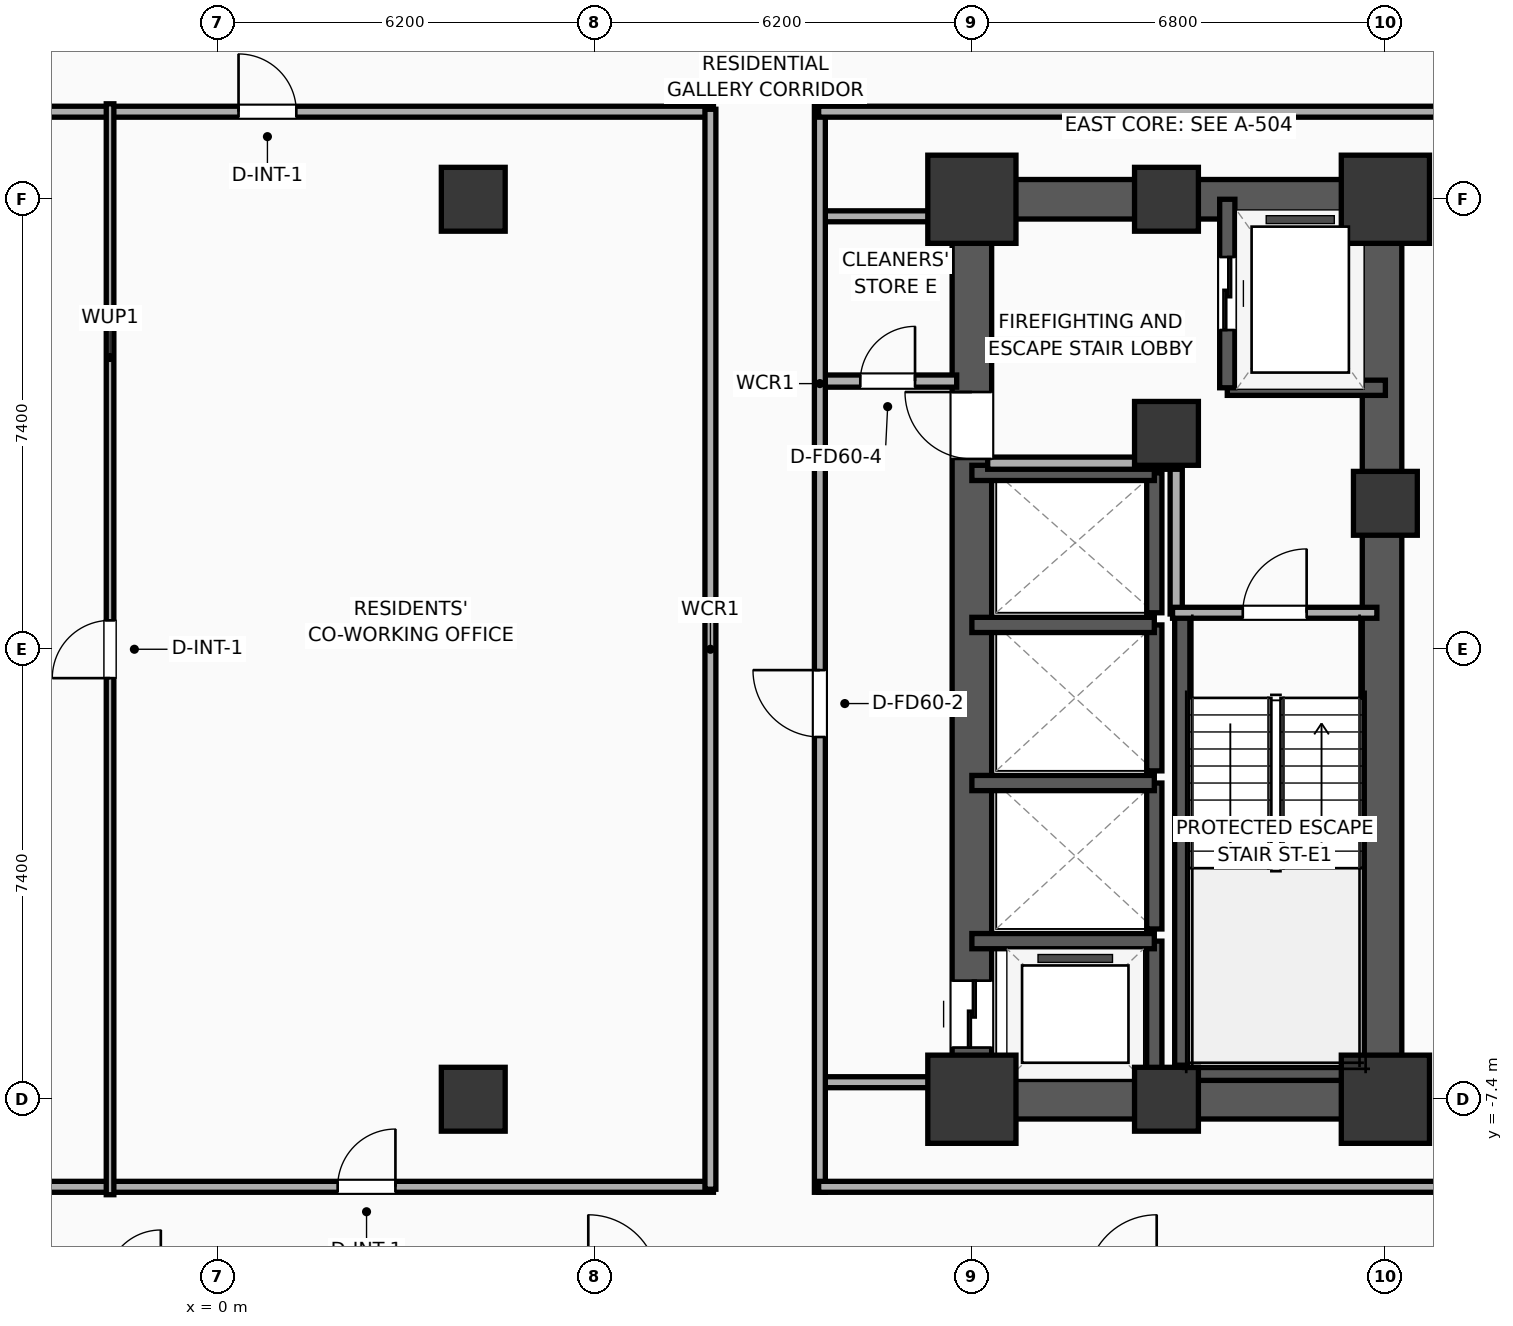
"""IFC4 building model, lengths in metres.
Left out: names, types, materials, properties, quantities, classifications, styles, units other than length and angle.
Written with IfcOpenShell. Run it as: python <this file> out.ifc"""

import sys

from ifc_helpers import new_model, si_unit, direction, frame, frame_2d, origin, origin_2d, place, context, subcontext, project, spatial, rectangle, extrude, element, fill, save


model = new_model("IFC4")
c1 = context("Model", 3, precision=1e-05, world=origin(), true_north=direction((0.0, 1.0)))
c2 = subcontext(c1, "Body", "Model", "MODEL_VIEW")
j1 = project(units=[si_unit("LENGTHUNIT", "METRE"), si_unit("PLANEANGLEUNIT", "RADIAN")], contexts=[c1])
p1 = place(None, origin())
s1 = spatial("IfcSite", under=j1, at=p1, CompositionType="ELEMENT")
p2 = place(p1, origin())
s2 = spatial("IfcBuilding", under=s1, at=p2, CompositionType="ELEMENT")
p3 = place(p2, frame((0.0, 0.0, 72.8)))
s3 = spatial("IfcBuildingStorey", under=s2, at=p3, CompositionType="ELEMENT", Elevation=72.8)
p4 = place(p3, frame((12.4, -7.4, 0.0), z_axis=(0.0, 0.0, 1.0), x_axis=(1.0, 0.0, 0.0)))
e1 = element("IfcColumn", 1, at=p4, inside=s3, PredefinedType="COLUMN", context=c2, shape_type="SweptSolid", body=[
    extrude(rectangle(XDim=1.45, YDim=1.45, at=origin_2d()), origin(), (0.0, 0.0, 1.0), 3.9),
])
p5 = place(p3, frame((15.6, 3.55, 0.0), z_axis=(0.0, 0.0, 1.0), x_axis=(1.0, 0.0, 0.0)))
e2 = element("IfcColumn", 2, at=p5, inside=s3, PredefinedType="COLUMN", context=c2, shape_type="SweptSolid", body=[
    extrude(rectangle(XDim=1.05, YDim=1.05, at=origin_2d()), origin(), (0.0, 0.0, 1.0), 3.9),
])
p6 = place(p3, frame((12.4, 7.4, 0.0), z_axis=(0.0, 0.0, 1.0), x_axis=(1.0, 0.0, 0.0)))
e3 = element("IfcColumn", 3, at=p6, inside=s3, PredefinedType="COLUMN", context=c2, shape_type="SweptSolid", body=[
    extrude(rectangle(XDim=1.45, YDim=1.45, at=origin_2d()), origin(), (0.0, 0.0, 1.0), 3.9),
])
for number, where, z_axis, x_axis in (
    (4, (15.6, -7.4, 0.0), (0.0, 0.0, 1.0), (1.0, 0.0, 0.0)),
    (5, (15.6, 7.4, 0.0), (0.0, 0.0, 1.0), (1.0, 0.0, 0.0)),
):
    element("IfcColumn", number, at=place(p3, frame(where, z_axis=z_axis, x_axis=x_axis)), inside=s3, PredefinedType="COLUMN", context=c2, shape_type="SweptSolid", body=[
        extrude(rectangle(XDim=1.05, YDim=1.05, at=origin_2d()), origin(), (0.0, 0.0, 1.0), 3.9),
    ])
p7 = place(p3, frame((19.2, -7.4, 0.0), z_axis=(0.0, 0.0, 1.0), x_axis=(1.0, 0.0, 0.0)))
e6 = element("IfcColumn", 6, at=p7, inside=s3, PredefinedType="COLUMN", context=c2, shape_type="SweptSolid", body=[
    extrude(rectangle(XDim=1.45, YDim=1.45, at=origin_2d()), origin(), (0.0, 0.0, 1.0), 3.9),
])
p8 = place(p3, frame((19.2, 2.4, 0.0), z_axis=(0.0, 0.0, 1.0), x_axis=(1.0, 0.0, 0.0)))
e7 = element("IfcColumn", 7, at=p8, inside=s3, PredefinedType="COLUMN", context=c2, shape_type="SweptSolid", body=[
    extrude(rectangle(XDim=1.05, YDim=1.05, at=origin_2d()), origin(), (0.0, 0.0, 1.0), 3.9),
])
p9 = place(p3, frame((19.2, 7.4, 0.0), z_axis=(0.0, 0.0, 1.0), x_axis=(1.0, 0.0, 0.0)))
e8 = element("IfcColumn", 8, at=p9, inside=s3, PredefinedType="COLUMN", context=c2, shape_type="SweptSolid", body=[
    extrude(rectangle(XDim=1.45, YDim=1.45, at=origin_2d()), origin(), (0.0, 0.0, 1.0), 3.9),
])
for number, where, z_axis, x_axis in (
    (9, (12.075, -7.4, 0.0), (0.0, 0.0, 1.0), (1.0, 0.0, 0.0)),
    (10, (12.075, 7.4, 0.0), (0.0, 0.0, 1.0), (1.0, 0.0, 0.0)),
):
    element("IfcWall", number, at=place(p3, frame(where, z_axis=z_axis, x_axis=x_axis)), inside=s3, PredefinedType="SHEAR", context=c2, shape_type="SweptSolid", body=[
        extrude(rectangle(XDim=7.45, YDim=0.65, at=frame_2d((3.725, 0.0))), origin(), (0.0, 0.0, 1.0), 3.65),
    ])
p10 = place(p3, frame((12.4, -7.4, 0.0), z_axis=(0.0, 0.0, 1.0), x_axis=(0.0, 1.0, 0.0)))
e11 = element("IfcWall", 11, at=p10, inside=s3, PredefinedType="SHEAR", context=c2, shape_type="SweptSolid", body=[
    extrude(rectangle(XDim=14.8, YDim=0.65, at=frame_2d((7.4, 0.0))), origin(), (0.0, 0.0, 1.0), 3.65),
])
p11 = place(p10, frame((0.85, 0.0, 0.0)))
e12 = element("IfcOpeningElement", 12, at=p11, cuts=e11, PredefinedType="OPENING", context=c2, shape_type="SweptSolid", body=[
    extrude(rectangle(XDim=1.1, YDim=2.05, at=frame_2d((0.55, 1.025))), frame((0.0, 0.335, 0.0), z_axis=(0.0, -1.0, 0.0), x_axis=(1.0, 0.0, 0.0)), (0.0, 0.0, 1.0), 0.67),
])
p12 = place(p10, frame((10.53, 0.0, 0.0)))
e13 = element("IfcOpeningElement", 13, at=p12, cuts=e11, PredefinedType="OPENING", context=c2, shape_type="SweptSolid", body=[
    extrude(rectangle(XDim=1.1, YDim=2.05, at=frame_2d((0.55, 1.025))), frame((0.0, 0.335, 0.0), z_axis=(0.0, -1.0, 0.0), x_axis=(1.0, 0.0, 0.0)), (0.0, 0.0, 1.0), 0.67),
])
p13 = place(p3, frame((19.145, -7.4, 0.0), z_axis=(0.0, 0.0, 1.0), x_axis=(0.0, 1.0, 0.0)))
e14 = element("IfcWall", 14, at=p13, inside=s3, PredefinedType="SHEAR", context=c2, shape_type="SweptSolid", body=[
    extrude(rectangle(XDim=14.8, YDim=0.65, at=frame_2d((7.4, 0.0))), origin(), (0.0, 0.0, 1.0), 3.65),
])
p14 = place(p3, frame((15.86, -7.085, 0.0), z_axis=(0.0, 0.0, 1.0), x_axis=(0.0, 1.0, 0.0)))
e15 = element("IfcWall", 15, at=p14, inside=s3, PredefinedType="SOLIDWALL", context=c2, shape_type="SweptSolid", body=[
    extrude(rectangle(XDim=7.685, YDim=0.25, at=frame_2d((3.843, 0.0))), origin(), (0.0, 0.0, 1.0), 3.65),
])
p15 = place(p3, frame((15.74, -6.965, 0.0), z_axis=(0.0, 0.0, 1.0), x_axis=(1.0, 0.0, 0.0)))
e16 = element("IfcWall", 16, at=p15, inside=s3, PredefinedType="SOLIDWALL", context=c2, shape_type="SweptSolid", body=[
    extrude(rectangle(XDim=3.46, YDim=0.25, at=frame_2d((1.73, 0.0))), origin(), (0.0, 0.0, 1.0), 3.65),
])
for number, where, z_axis, x_axis in (
    (17, (4.2, -7.4, 0.0), (0.0, 0.0, 1.0), (1.0, 0.0, 0.0)),
    (18, (4.2, 7.4, 0.0), (0.0, 0.0, 1.0), (1.0, 0.0, 0.0)),
):
    element("IfcColumn", number, at=place(p3, frame(where, z_axis=z_axis, x_axis=x_axis)), inside=s3, PredefinedType="COLUMN", context=c2, shape_type="SweptSolid", body=[
        extrude(rectangle(XDim=1.05, YDim=1.05, at=origin_2d()), origin(), (0.0, 0.0, 1.0), 3.9),
    ])
p16 = place(p3, frame((16.6, 4.3, 0.0), z_axis=(0.0, 0.0, 1.0), x_axis=(1.0, 0.0, 0.0)))
e19 = element("IfcWall", 19, at=p16, inside=s3, PredefinedType="SOLIDWALL", context=c2, shape_type="SweptSolid", body=[
    extrude(rectangle(XDim=2.6, YDim=0.25, at=frame_2d((1.3, 0.0))), origin(), (0.0, 0.0, 1.0), 3.65),
])
p17 = place(p3, frame((16.6, 7.4, 0.0), z_axis=(0.0, 0.0, 1.0), x_axis=(0.0, -1.0, 0.0)))
e20 = element("IfcWall", 20, at=p17, inside=s3, PredefinedType="SOLIDWALL", context=c2, shape_type="SweptSolid", body=[
    extrude(rectangle(XDim=3.1, YDim=0.25, at=frame_2d((1.55, 0.0))), origin(), (0.0, 0.0, 1.0), 3.65),
])
p18 = place(p17, frame((0.95, 0.0, 0.0)))
e21 = element("IfcOpeningElement", 21, at=p18, cuts=e20, PredefinedType="OPENING", context=c2, shape_type="SweptSolid", body=[
    extrude(rectangle(XDim=1.2, YDim=2.05, at=frame_2d((0.6, 1.025))), frame((0.0, 0.135, 0.0), z_axis=(0.0, -1.0, 0.0), x_axis=(1.0, 0.0, 0.0)), (0.0, 0.0, 1.0), 0.27),
])
p19 = place(p3, frame((15.4, -7.4, 0.0), z_axis=(0.0, 0.0, 1.0), x_axis=(0.0, 1.0, 0.0)))
e22 = element("IfcWall", 22, at=p19, inside=s3, PredefinedType="SOLIDWALL", context=c2, shape_type="SweptSolid", body=[
    extrude(rectangle(XDim=2.6, YDim=0.25, at=frame_2d((1.3, 0.0))), origin(), (0.0, 0.0, 1.0), 3.65),
])
p20 = place(p3, frame((15.4, -4.8, 0.0), z_axis=(0.0, 0.0, 1.0), x_axis=(-1.0, 0.0, 0.0)))
e23 = element("IfcWall", 23, at=p20, inside=s3, PredefinedType="SOLIDWALL", context=c2, shape_type="SweptSolid", body=[
    extrude(rectangle(XDim=3.0, YDim=0.25, at=frame_2d((1.5, 0.0))), origin(), (0.0, 0.0, 1.0), 3.65),
])
p21 = place(p3, frame((15.4, -4.6, 0.0), z_axis=(0.0, 0.0, 1.0), x_axis=(0.0, 1.0, 0.0)))
e24 = element("IfcWall", 24, at=p21, inside=s3, PredefinedType="SOLIDWALL", context=c2, shape_type="SweptSolid", body=[
    extrude(rectangle(XDim=2.4, YDim=0.25, at=frame_2d((1.2, 0.0))), origin(), (0.0, 0.0, 1.0), 3.65),
])
p22 = place(p3, frame((15.4, -2.2, 0.0), z_axis=(0.0, 0.0, 1.0), x_axis=(-1.0, 0.0, 0.0)))
e25 = element("IfcWall", 25, at=p22, inside=s3, PredefinedType="SOLIDWALL", context=c2, shape_type="SweptSolid", body=[
    extrude(rectangle(XDim=3.0, YDim=0.25, at=frame_2d((1.5, 0.0))), origin(), (0.0, 0.0, 1.0), 3.65),
])
p23 = place(p3, frame((15.4, -2.0, 0.0), z_axis=(0.0, 0.0, 1.0), x_axis=(0.0, 1.0, 0.0)))
e26 = element("IfcWall", 26, at=p23, inside=s3, PredefinedType="SOLIDWALL", context=c2, shape_type="SweptSolid", body=[
    extrude(rectangle(XDim=2.4, YDim=0.25, at=frame_2d((1.2, 0.0))), origin(), (0.0, 0.0, 1.0), 3.65),
])
p24 = place(p3, frame((15.4, 0.4, 0.0), z_axis=(0.0, 0.0, 1.0), x_axis=(-1.0, 0.0, 0.0)))
e27 = element("IfcWall", 27, at=p24, inside=s3, PredefinedType="SOLIDWALL", context=c2, shape_type="SweptSolid", body=[
    extrude(rectangle(XDim=3.0, YDim=0.25, at=frame_2d((1.5, 0.0))), origin(), (0.0, 0.0, 1.0), 3.65),
])
p25 = place(p3, frame((15.4, 0.6, 0.0), z_axis=(0.0, 0.0, 1.0), x_axis=(0.0, 1.0, 0.0)))
e28 = element("IfcWall", 28, at=p25, inside=s3, PredefinedType="SOLIDWALL", context=c2, shape_type="SweptSolid", body=[
    extrude(rectangle(XDim=2.3, YDim=0.25, at=frame_2d((1.15, 0.0))), origin(), (0.0, 0.0, 1.0), 3.65),
])
p26 = place(p3, frame((15.4, 2.9, 0.0), z_axis=(0.0, 0.0, 1.0), x_axis=(-1.0, 0.0, 0.0)))
e29 = element("IfcWall", 29, at=p26, inside=s3, PredefinedType="SOLIDWALL", context=c2, shape_type="SweptSolid", body=[
    extrude(rectangle(XDim=3.0, YDim=0.25, at=frame_2d((1.5, 0.0))), origin(), (0.0, 0.0, 1.0), 3.65),
])
p27 = place(p3, frame((15.76, 0.58, 0.0), z_axis=(0.0, 0.0, 1.0), x_axis=(0.0, 1.0, 0.0)))
e30 = element("IfcWall", 30, at=p27, inside=s3, PredefinedType="PARTITIONING", context=c2, shape_type="SweptSolid", body=[
    extrude(rectangle(XDim=2.52, YDim=0.2, at=frame_2d((1.26, 0.0))), origin(), (0.0, 0.0, 1.0), 3.65),
])
p28 = place(p3, frame((12.66, 3.06, 0.0), z_axis=(0.0, 0.0, 1.0), x_axis=(1.0, 0.0, 0.0)))
e31 = element("IfcWall", 31, at=p28, inside=s3, PredefinedType="PARTITIONING", context=c2, shape_type="SweptSolid", body=[
    extrude(rectangle(XDim=3.16, YDim=0.2, at=frame_2d((1.58, 0.0))), origin(), (0.0, 0.0, 1.0), 3.65),
])
p29 = place(p3, frame((15.7, 0.6, 0.0), z_axis=(0.0, 0.0, 1.0), x_axis=(1.0, 0.0, 0.0)))
e32 = element("IfcWall", 32, at=p29, inside=s3, PredefinedType="PARTITIONING", context=c2, shape_type="SweptSolid", body=[
    extrude(rectangle(XDim=3.36, YDim=0.18, at=frame_2d((1.68, 0.0))), origin(), (0.0, 0.0, 1.0), 3.65),
])
p30 = place(p29, frame((1.155, 0.0, 0.0)))
e33 = element("IfcOpeningElement", 33, at=p30, cuts=e32, PredefinedType="OPENING", context=c2, shape_type="SweptSolid", body=[
    extrude(rectangle(XDim=1.05, YDim=2.05, at=frame_2d((0.525, 1.025))), frame((0.0, 0.1, 0.0), z_axis=(0.0, -1.0, 0.0), x_axis=(1.0, 0.0, 0.0)), (0.0, 0.0, 1.0), 0.2),
])
p31 = place(p3, frame((9.88, 4.41, 0.0), z_axis=(0.0, 0.0, 1.0), x_axis=(1.0, 0.0, 0.0)))
e34 = element("IfcWall", 34, at=p31, inside=s3, PredefinedType="PARTITIONING", context=c2, shape_type="SweptSolid", body=[
    extrude(rectangle(XDim=2.27, YDim=0.2, at=frame_2d((1.135, 0.0))), origin(), (0.0, 0.0, 1.0), 3.65),
])
p32 = place(p31, frame((0.685, 0.0, 0.0)))
e35 = element("IfcOpeningElement", 35, at=p32, cuts=e34, PredefinedType="OPENING", context=c2, shape_type="SweptSolid", body=[
    extrude(rectangle(XDim=0.9, YDim=2.05, at=frame_2d((0.45, 1.025))), frame((0.0, 0.11, 0.0), z_axis=(0.0, -1.0, 0.0), x_axis=(1.0, 0.0, 0.0)), (0.0, 0.0, 1.0), 0.22),
])
for number, where, z_axis, x_axis in (
    (36, (9.88, 7.12, 0.0), (0.0, 0.0, 1.0), (1.0, 0.0, 0.0)),
    (37, (9.88, -7.12, 0.0), (0.0, 0.0, 1.0), (1.0, 0.0, 0.0)),
):
    element("IfcWall", number, at=place(p3, frame(where, z_axis=z_axis, x_axis=x_axis)), inside=s3, PredefinedType="PARTITIONING", context=c2, shape_type="SweptSolid", body=[
        extrude(rectangle(XDim=2.27, YDim=0.18, at=frame_2d((1.135, 0.0))), origin(), (0.0, 0.0, 1.0), 2.94),
    ])
p33 = place(p3, frame((9.9, -8.93, 0.0), z_axis=(0.0, 0.0, 1.0), x_axis=(0.0, 1.0, 0.0)))
e38 = element("IfcWall", 38, at=p33, inside=s3, PredefinedType="PARTITIONING", context=c2, shape_type="SweptSolid", body=[
    extrude(rectangle(XDim=17.86, YDim=0.18, at=frame_2d((8.93, 0.0))), origin(), (0.0, 0.0, 1.0), 3.65),
])
p34 = place(p33, frame((7.487, 0.0, 0.0)))
e39 = element("IfcOpeningElement", 39, at=p34, cuts=e38, PredefinedType="OPENING", context=c2, shape_type="SweptSolid", body=[
    extrude(rectangle(XDim=1.1, YDim=2.05, at=frame_2d((0.55, 1.025))), frame((0.0, 0.1, 0.0), z_axis=(0.0, -1.0, 0.0), x_axis=(1.0, 0.0, 0.0)), (0.0, 0.0, 1.0), 0.2),
])
p35 = place(p3, frame((9.88, 8.84, 0.0), z_axis=(0.0, 0.0, 1.0), x_axis=(1.0, 0.0, 0.0)))
e40 = element("IfcWall", 40, at=p35, inside=s3, PredefinedType="PARTITIONING", context=c2, shape_type="SweptSolid", body=[
    extrude(rectangle(XDim=16.33, YDim=0.18, at=frame_2d((8.165, 0.0))), origin(), (0.0, 0.0, 1.0), 3.65),
])
p36 = place(p35, frame((14.365, 0.0, 0.0)))
e41 = element("IfcOpeningElement", 41, at=p36, cuts=e40, PredefinedType="OPENING", context=c2, shape_type="SweptSolid", body=[
    extrude(rectangle(XDim=0.9, YDim=2.05, at=frame_2d((0.45, 1.025))), frame((0.0, 0.1, 0.0), z_axis=(0.0, -1.0, 0.0), x_axis=(1.0, 0.0, 0.0)), (0.0, 0.0, 1.0), 0.2),
])
p37 = place(p3, frame((9.88, -8.84, 0.0), z_axis=(0.0, 0.0, 1.0), x_axis=(1.0, 0.0, 0.0)))
e42 = element("IfcWall", 42, at=p37, inside=s3, PredefinedType="PARTITIONING", context=c2, shape_type="SweptSolid", body=[
    extrude(rectangle(XDim=16.33, YDim=0.18, at=frame_2d((8.165, 0.0))), origin(), (0.0, 0.0, 1.0), 3.65),
])
p38 = place(p3, frame((-8.15, 8.84, 0.0), z_axis=(0.0, 0.0, 1.0), x_axis=(1.0, 0.0, 0.0)))
e43 = element("IfcWall", 43, at=p38, inside=s3, PredefinedType="PARTITIONING", context=c2, shape_type="SweptSolid", body=[
    extrude(rectangle(XDim=16.3, YDim=0.18, at=frame_2d((8.15, 0.0))), origin(), (0.0, 0.0, 1.0), 3.65),
])
p39 = place(p38, frame((8.49, 0.0, 0.0)))
e44 = element("IfcOpeningElement", 44, at=p39, cuts=e43, PredefinedType="OPENING", context=c2, shape_type="SweptSolid", body=[
    extrude(rectangle(XDim=0.95, YDim=2.05, at=frame_2d((0.475, 1.025))), frame((0.0, 0.1, 0.0), z_axis=(0.0, -1.0, 0.0), x_axis=(1.0, 0.0, 0.0)), (0.0, 0.0, 1.0), 0.2),
])
p40 = place(p3, frame((-8.15, -8.84, 0.0), z_axis=(0.0, 0.0, 1.0), x_axis=(1.0, 0.0, 0.0)))
e45 = element("IfcWall", 45, at=p40, inside=s3, PredefinedType="PARTITIONING", context=c2, shape_type="SweptSolid", body=[
    extrude(rectangle(XDim=16.3, YDim=0.18, at=frame_2d((8.15, 0.0))), origin(), (0.0, 0.0, 1.0), 3.65),
])
p41 = place(p40, frame((1.13, 0.0, 0.0)))
e46 = element("IfcOpeningElement", 46, at=p41, cuts=e45, PredefinedType="OPENING", context=c2, shape_type="SweptSolid", body=[
    extrude(rectangle(XDim=1.0, YDim=2.05, at=frame_2d((0.5, 1.025))), frame((0.0, 0.1, 0.0), z_axis=(0.0, -1.0, 0.0), x_axis=(1.0, 0.0, 0.0)), (0.0, 0.0, 1.0), 0.2),
])
p42 = place(p40, frame((10.12, 0.0, 0.0)))
e47 = element("IfcOpeningElement", 47, at=p42, cuts=e45, PredefinedType="OPENING", context=c2, shape_type="SweptSolid", body=[
    extrude(rectangle(XDim=0.95, YDim=2.05, at=frame_2d((0.475, 1.025))), frame((0.0, 0.1, 0.0), z_axis=(0.0, -1.0, 0.0), x_axis=(1.0, 0.0, 0.0)), (0.0, 0.0, 1.0), 0.2),
])
p43 = place(p3, frame((8.1, -8.88, 0.0), z_axis=(0.0, 0.0, 1.0), x_axis=(0.0, 1.0, 0.0)))
e48 = element("IfcWall", 48, at=p43, inside=s3, PredefinedType="PARTITIONING", context=c2, shape_type="SweptSolid", body=[
    extrude(rectangle(XDim=17.76, YDim=0.18, at=frame_2d((8.88, 0.0))), origin(), (0.0, 0.0, 1.0), 3.65),
])
p44 = place(p3, frame((-1.773, -8.97, 0.0), z_axis=(0.0, 0.0, 1.0), x_axis=(0.0, 1.0, 0.0)))
e49 = element("IfcWall", 49, at=p44, inside=s3, PredefinedType="PARTITIONING", context=c2, shape_type="SweptSolid", body=[
    extrude(rectangle(XDim=17.94, YDim=0.125, at=frame_2d((8.97, 0.0))), origin(), (0.0, 0.0, 1.0), 3.65),
])
p45 = place(p44, frame((8.495, 0.0, 0.0)))
e50 = element("IfcOpeningElement", 50, at=p45, cuts=e49, PredefinedType="OPENING", context=c2, shape_type="SweptSolid", body=[
    extrude(rectangle(XDim=0.95, YDim=2.05, at=frame_2d((0.475, 1.025))), frame((0.0, 0.073, 0.0), z_axis=(0.0, -1.0, 0.0), x_axis=(1.0, 0.0, 0.0)), (0.0, 0.0, 1.0), 0.145),
])
p46 = place(p18, origin())
e51 = element("IfcDoor", 51, at=p46, inside=s3, OperationType="SLIDING_TO_LEFT", PredefinedType="DOOR", context=c2, shape_type="SweptSolid", body=[
    extrude(rectangle(XDim=1.2, YDim=2.05, at=frame_2d((0.6, 1.025))), frame((0.0, 0.025, 0.0), z_axis=(0.0, -1.0, 0.0), x_axis=(1.0, 0.0, 0.0)), (0.0, 0.0, 1.0), 0.05),
])
fill(e21, e51)
p47 = place(p11, origin())
e52 = element("IfcDoor", 52, at=p47, inside=s3, OperationType="SLIDING_TO_LEFT", PredefinedType="DOOR", context=c2, shape_type="SweptSolid", body=[
    extrude(rectangle(XDim=1.1, YDim=2.05, at=frame_2d((0.55, 1.025))), frame((0.0, 0.025, 0.0), z_axis=(0.0, -1.0, 0.0), x_axis=(1.0, 0.0, 0.0)), (0.0, 0.0, 1.0), 0.05),
])
fill(e12, e52)
p48 = place(p30, origin())
e53 = element("IfcDoor", 53, at=p48, inside=s3, OperationType="SINGLE_SWING_RIGHT", PredefinedType="DOOR", context=c2, shape_type="SweptSolid", body=[
    extrude(rectangle(XDim=1.05, YDim=2.05, at=frame_2d((0.525, 1.025))), frame((0.0, 0.025, 0.0), z_axis=(0.0, -1.0, 0.0), x_axis=(1.0, 0.0, 0.0)), (0.0, 0.0, 1.0), 0.05),
])
fill(e33, e53)
p49 = place(p32, origin())
e54 = element("IfcDoor", 54, at=p49, inside=s3, OperationType="SINGLE_SWING_RIGHT", PredefinedType="DOOR", context=c2, shape_type="SweptSolid", body=[
    extrude(rectangle(XDim=0.9, YDim=2.05, at=frame_2d((0.45, 1.025))), frame((0.0, 0.025, 0.0), z_axis=(0.0, -1.0, 0.0), x_axis=(1.0, 0.0, 0.0)), (0.0, 0.0, 1.0), 0.05),
])
fill(e35, e54)
p50 = place(p34, origin())
e55 = element("IfcDoor", 55, at=p50, inside=s3, OperationType="SINGLE_SWING_RIGHT", PredefinedType="DOOR", context=c2, shape_type="SweptSolid", body=[
    extrude(rectangle(XDim=1.1, YDim=2.05, at=frame_2d((0.55, 1.025))), frame((0.0, 0.025, 0.0), z_axis=(0.0, -1.0, 0.0), x_axis=(1.0, 0.0, 0.0)), (0.0, 0.0, 1.0), 0.05),
])
fill(e39, e55)
p51 = place(p39, origin())
e56 = element("IfcDoor", 56, at=p51, inside=s3, OperationType="SINGLE_SWING_LEFT", PredefinedType="DOOR", context=c2, shape_type="SweptSolid", body=[
    extrude(rectangle(XDim=0.95, YDim=2.05, at=frame_2d((0.475, 1.025))), frame((0.0, 0.025, 0.0), z_axis=(0.0, -1.0, 0.0), x_axis=(1.0, 0.0, 0.0)), (0.0, 0.0, 1.0), 0.05),
])
fill(e44, e56)
p52 = place(p42, origin())
e57 = element("IfcDoor", 57, at=p52, inside=s3, OperationType="SINGLE_SWING_RIGHT", PredefinedType="DOOR", context=c2, shape_type="SweptSolid", body=[
    extrude(rectangle(XDim=0.95, YDim=2.05, at=frame_2d((0.475, 1.025))), frame((0.0, 0.025, 0.0), z_axis=(0.0, -1.0, 0.0), x_axis=(1.0, 0.0, 0.0)), (0.0, 0.0, 1.0), 0.05),
])
fill(e47, e57)
p53 = place(p45, origin())
e58 = element("IfcDoor", 58, at=p53, inside=s3, OperationType="SINGLE_SWING_LEFT", PredefinedType="DOOR", context=c2, shape_type="SweptSolid", body=[
    extrude(rectangle(XDim=0.95, YDim=2.05, at=frame_2d((0.475, 1.025))), frame((0.0, 0.025, 0.0), z_axis=(0.0, -1.0, 0.0), x_axis=(1.0, 0.0, 0.0)), (0.0, 0.0, 1.0), 0.05),
])
fill(e50, e58)
p54 = place(p12, origin())
e59 = element("IfcDoor", 59, at=p54, inside=s3, OperationType="SINGLE_SWING_RIGHT", PredefinedType="DOOR", context=c2, shape_type="SweptSolid", body=[
    extrude(rectangle(XDim=1.1, YDim=2.05, at=frame_2d((0.55, 1.025))), frame((0.0, 0.025, 0.0), z_axis=(0.0, -1.0, 0.0), x_axis=(1.0, 0.0, 0.0)), (0.0, 0.0, 1.0), 0.05),
])
fill(e13, e59)
save(model, sys.argv[1])
